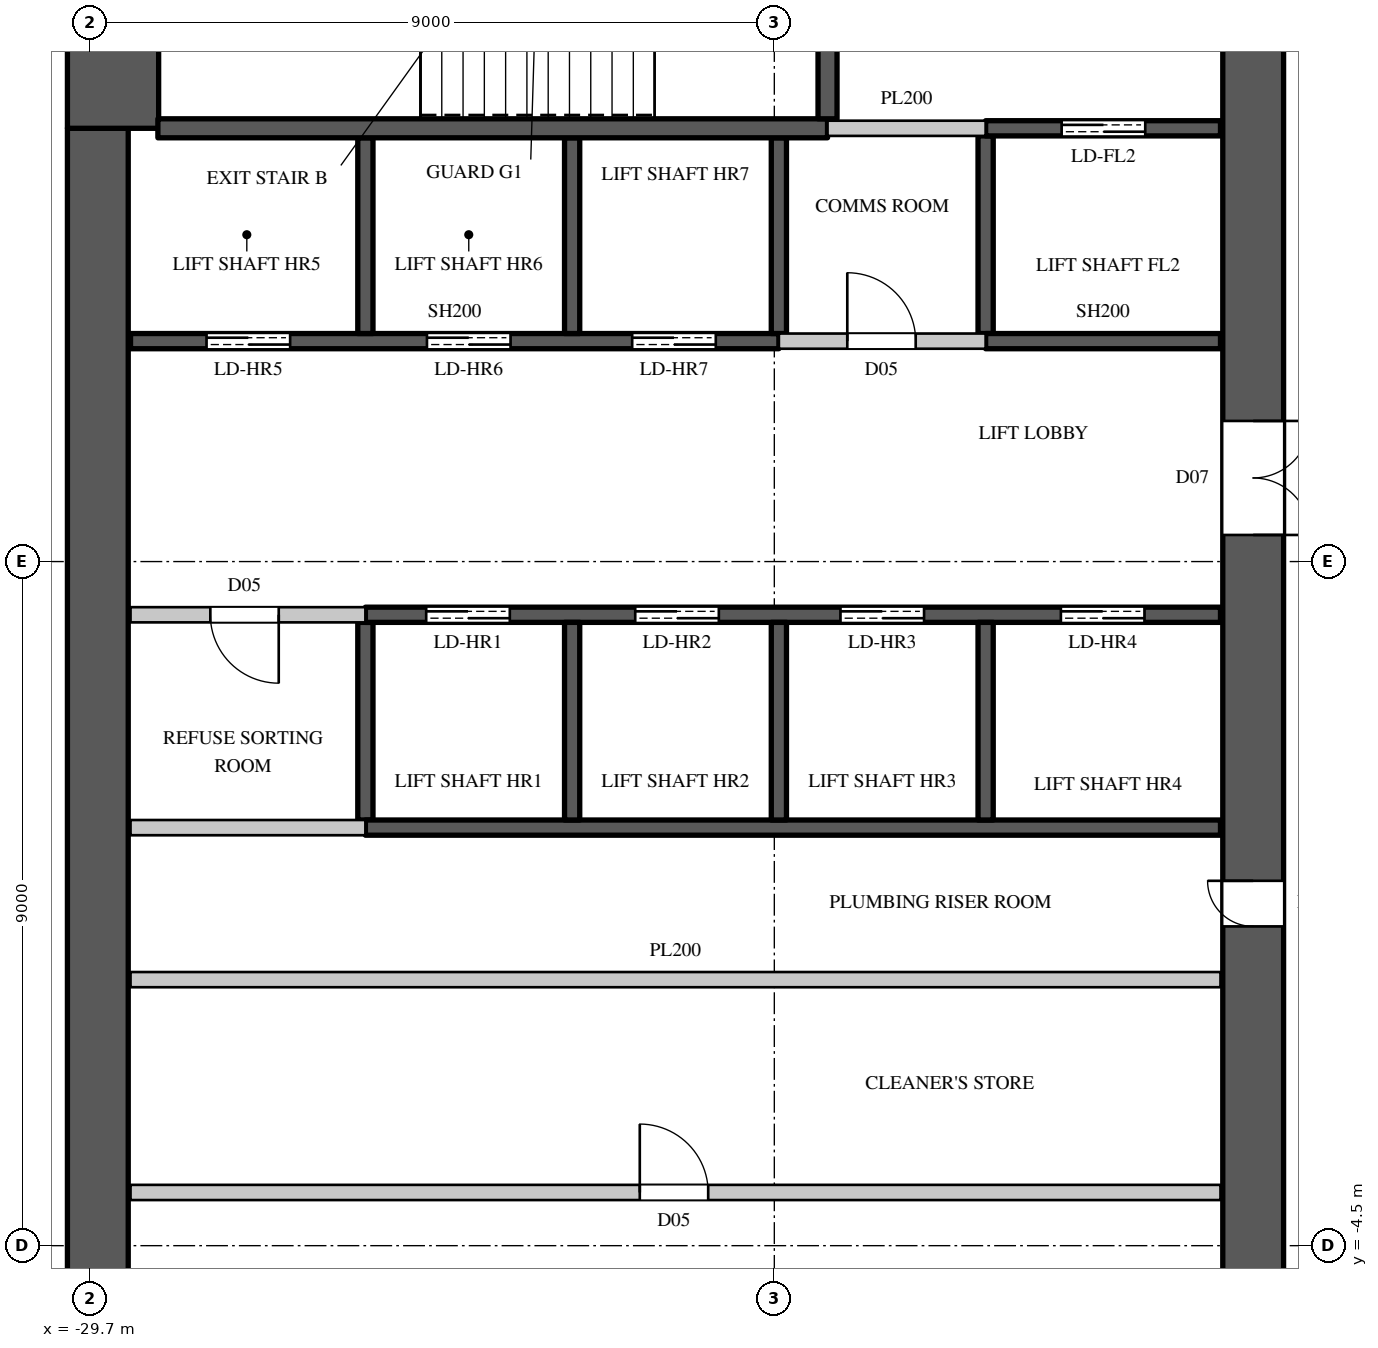
"""IFC4 building model, lengths in metres.
Left out: names, types, materials, properties, quantities, classifications, styles, units other than length and angle.
Written with IfcOpenShell. Run it as: python <this file> out.ifc"""

import sys

from ifc_helpers import new_model, si_unit, direction, frame, frame_2d, origin, place, context, subcontext, project, spatial, rectangle, extrude, element, fill, save


model = new_model("IFC4")
c1 = context("Model", 3, precision=1e-05, world=origin(), true_north=direction((0.0, 1.0)))
c2 = subcontext(c1, "Body", "Model", "MODEL_VIEW")
j1 = project(units=[si_unit("LENGTHUNIT", "METRE"), si_unit("PLANEANGLEUNIT", "RADIAN")], contexts=[c1])
p1 = place(None, origin())
s1 = spatial("IfcSite", under=j1, at=p1, CompositionType="ELEMENT")
p2 = place(p1, origin())
s2 = spatial("IfcBuilding", under=s1, at=p2, CompositionType="ELEMENT")
p3 = place(p2, frame((0.0, 0.0, 181.0)))
s3 = spatial("IfcBuildingStorey", under=s2, at=p3, CompositionType="ELEMENT", Elevation=181.0)
p4 = place(p3, frame((-14.4, -14.8, 0.0), z_axis=(0.0, 0.0, 1.0), x_axis=(0.0, 1.0, 0.0)))
e1 = element("IfcWall", 1, at=p4, inside=s3, PredefinedType="SHEAR", context=c2, shape_type="SweptSolid", body=[
    extrude(rectangle(XDim=29.6, YDim=0.8, at=frame_2d((14.8, 0.0))), origin(), (0.0, 0.0, 1.0), 4.1),
])
p5 = place(p4, frame((1.55, 0.0, 0.0)))
e2 = element("IfcOpeningElement", 2, at=p5, cuts=e1, PredefinedType="OPENING", context=c2, shape_type="SweptSolid", body=[
    extrude(rectangle(XDim=1.5, YDim=2.4, at=frame_2d((0.75, 1.2))), frame((0.0, 0.41, 0.0), z_axis=(0.0, -1.0, 0.0), x_axis=(1.0, 0.0, 0.0)), (0.0, 0.0, 1.0), 0.82),
])
p6 = place(p4, frame((26.55, 0.0, 0.0)))
e3 = element("IfcOpeningElement", 3, at=p6, cuts=e1, PredefinedType="OPENING", context=c2, shape_type="SweptSolid", body=[
    extrude(rectangle(XDim=1.5, YDim=2.4, at=frame_2d((0.75, 1.2))), frame((0.0, 0.41, 0.0), z_axis=(0.0, -1.0, 0.0), x_axis=(1.0, 0.0, 0.0)), (0.0, 0.0, 1.0), 0.82),
])
p7 = place(p4, frame((8.45, 0.0, 0.0)))
e4 = element("IfcOpeningElement", 4, at=p7, cuts=e1, PredefinedType="OPENING", context=c2, shape_type="SweptSolid", body=[
    extrude(rectangle(XDim=1.5, YDim=2.4, at=frame_2d((0.75, 1.2))), frame((0.0, 0.41, 0.0), z_axis=(0.0, -1.0, 0.0), x_axis=(1.0, 0.0, 0.0)), (0.0, 0.0, 1.0), 0.82),
])
p8 = place(p4, frame((19.65, 0.0, 0.0)))
e5 = element("IfcOpeningElement", 5, at=p8, cuts=e1, PredefinedType="OPENING", context=c2, shape_type="SweptSolid", body=[
    extrude(rectangle(XDim=1.5, YDim=2.4, at=frame_2d((0.75, 1.2))), frame((0.0, 0.41, 0.0), z_axis=(0.0, -1.0, 0.0), x_axis=(1.0, 0.0, 0.0)), (0.0, 0.0, 1.0), 0.82),
])
p9 = place(p4, frame((14.5, 0.0, 0.0)))
e6 = element("IfcOpeningElement", 6, at=p9, cuts=e1, PredefinedType="OPENING", context=c2, shape_type="SweptSolid", body=[
    extrude(rectangle(XDim=0.6, YDim=2.0, at=frame_2d((0.3, 1.0))), frame((0.0, 0.41, 0.0), z_axis=(0.0, -1.0, 0.0), x_axis=(1.0, 0.0, 0.0)), (0.0, 0.0, 1.0), 0.82),
])
p10 = place(p3, frame((-29.6, -10.2, 0.0), z_axis=(0.0, 0.0, 1.0), x_axis=(0.0, 1.0, 0.0)))
e7 = element("IfcWall", 7, at=p10, inside=s3, PredefinedType="SHEAR", context=c2, shape_type="SweptSolid", body=[
    extrude(rectangle(XDim=20.4, YDim=0.8, at=frame_2d((10.2, 0.0))), origin(), (0.0, 0.0, 1.0), 4.1),
])
p11 = place(p3, frame((-29.4, 10.2, 0.0), z_axis=(0.0, 0.0, 1.0), x_axis=(0.0, 1.0, 0.0)))
e8 = element("IfcWall", 8, at=p11, inside=s3, PredefinedType="SHEAR", context=c2, shape_type="SweptSolid", body=[
    extrude(rectangle(XDim=4.6, YDim=1.2, at=frame_2d((2.3, 0.0))), origin(), (0.0, 0.0, 1.0), 4.1),
])
p12 = place(p3, frame((-29.17, -3.8, 0.0), z_axis=(0.0, 0.0, 1.0), x_axis=(1.0, 0.0, 0.0)))
e9 = element("IfcWall", 9, at=p12, inside=s3, PredefinedType="PARTITIONING", context=c2, shape_type="SweptSolid", body=[
    extrude(rectangle(XDim=14.34, YDim=0.2, at=frame_2d((7.17, 0.0))), origin(), (0.0, 0.0, 1.0), 3.8),
])
p13 = place(p12, frame((6.7, 0.0, 0.0)))
e10 = element("IfcOpeningElement", 10, at=p13, cuts=e9, PredefinedType="OPENING", context=c2, shape_type="SweptSolid", body=[
    extrude(rectangle(XDim=0.9, YDim=2.2, at=frame_2d((0.45, 1.1))), frame((0.0, 0.11, 0.0), z_axis=(0.0, -1.0, 0.0), x_axis=(1.0, 0.0, 0.0)), (0.0, 0.0, 1.0), 0.22),
])
p14 = place(p3, frame((-29.17, 3.8, 0.0), z_axis=(0.0, 0.0, 1.0), x_axis=(1.0, 0.0, 0.0)))
e11 = element("IfcWall", 11, at=p14, inside=s3, PredefinedType="PARTITIONING", context=c2, shape_type="SweptSolid", body=[
    extrude(rectangle(XDim=3.09, YDim=0.2, at=frame_2d((1.545, 0.0))), origin(), (0.0, 0.0, 1.0), 3.8),
])
p15 = place(p14, frame((1.05, 0.0, 0.0)))
e12 = element("IfcOpeningElement", 12, at=p15, cuts=e11, PredefinedType="OPENING", context=c2, shape_type="SweptSolid", body=[
    extrude(rectangle(XDim=0.9, YDim=2.2, at=frame_2d((0.45, 1.1))), frame((0.0, 0.11, 0.0), z_axis=(0.0, -1.0, 0.0), x_axis=(1.0, 0.0, 0.0)), (0.0, 0.0, 1.0), 0.22),
])
p16 = place(p3, frame((-29.17, -1.0, 0.0), z_axis=(0.0, 0.0, 1.0), x_axis=(1.0, 0.0, 0.0)))
e13 = element("IfcWall", 13, at=p16, inside=s3, PredefinedType="PARTITIONING", context=c2, shape_type="SweptSolid", body=[
    extrude(rectangle(XDim=14.34, YDim=0.2, at=frame_2d((7.17, 0.0))), origin(), (0.0, 0.0, 1.0), 3.8),
])
p17 = place(p3, frame((-29.17, 1.0, 0.0), z_axis=(0.0, 0.0, 1.0), x_axis=(1.0, 0.0, 0.0)))
e14 = element("IfcWall", 14, at=p17, inside=s3, PredefinedType="PARTITIONING", context=c2, shape_type="SweptSolid", body=[
    extrude(rectangle(XDim=3.09, YDim=0.2, at=frame_2d((1.545, 0.0))), origin(), (0.0, 0.0, 1.0), 3.8),
])
p18 = place(p3, frame((-20.64, 7.4, 0.0), z_axis=(0.0, 0.0, 1.0), x_axis=(1.0, 0.0, 0.0)))
e15 = element("IfcWall", 15, at=p18, inside=s3, PredefinedType="PARTITIONING", context=c2, shape_type="SweptSolid", body=[
    extrude(rectangle(XDim=2.72, YDim=0.2, at=frame_2d((1.36, 0.0))), origin(), (0.0, 0.0, 1.0), 3.8),
])
p19 = place(p18, frame((0.9, 0.0, 0.0)))
e16 = element("IfcOpeningElement", 16, at=p19, cuts=e15, PredefinedType="OPENING", context=c2, shape_type="SweptSolid", body=[
    extrude(rectangle(XDim=0.9, YDim=2.2, at=frame_2d((0.45, 1.1))), frame((0.0, 0.11, 0.0), z_axis=(0.0, -1.0, 0.0), x_axis=(1.0, 0.0, 0.0)), (0.0, 0.0, 1.0), 0.22),
])
p20 = place(p3, frame((-20.0, 10.2, 0.0), z_axis=(0.0, 0.0, 1.0), x_axis=(1.0, 0.0, 0.0)))
e17 = element("IfcWall", 17, at=p20, inside=s3, PredefinedType="PARTITIONING", context=c2, shape_type="SweptSolid", body=[
    extrude(rectangle(XDim=2.08, YDim=0.2, at=frame_2d((1.04, 0.0))), origin(), (0.0, 0.0, 1.0), 3.8),
])
p21 = place(p3, frame((-29.17, 7.4, 0.0), z_axis=(0.0, 0.0, 1.0), x_axis=(1.0, 0.0, 0.0)))
e18 = element("IfcWall", 18, at=p21, inside=s3, PredefinedType="SHEAR", context=c2, shape_type="SweptSolid", body=[
    extrude(rectangle(XDim=8.53, YDim=0.2, at=frame_2d((4.265, 0.0))), origin(), (0.0, 0.0, 1.0), 3.8),
])
p22 = place(p21, frame((1.0, 0.0, 0.0)))
e19 = element("IfcOpeningElement", 19, at=p22, cuts=e18, PredefinedType="OPENING", context=c2, shape_type="SweptSolid", body=[
    extrude(rectangle(XDim=1.1, YDim=2.2, at=frame_2d((0.55, 1.1))), frame((0.0, 0.11, 0.0), z_axis=(0.0, -1.0, 0.0), x_axis=(1.0, 0.0, 0.0)), (0.0, 0.0, 1.0), 0.22),
])
p23 = place(p21, frame((3.9, 0.0, 0.0)))
e20 = element("IfcOpeningElement", 20, at=p23, cuts=e18, PredefinedType="OPENING", context=c2, shape_type="SweptSolid", body=[
    extrude(rectangle(XDim=1.1, YDim=2.2, at=frame_2d((0.55, 1.1))), frame((0.0, 0.11, 0.0), z_axis=(0.0, -1.0, 0.0), x_axis=(1.0, 0.0, 0.0)), (0.0, 0.0, 1.0), 0.22),
])
p24 = place(p21, frame((6.6, 0.0, 0.0)))
e21 = element("IfcOpeningElement", 21, at=p24, cuts=e18, PredefinedType="OPENING", context=c2, shape_type="SweptSolid", body=[
    extrude(rectangle(XDim=1.1, YDim=2.2, at=frame_2d((0.55, 1.1))), frame((0.0, 0.11, 0.0), z_axis=(0.0, -1.0, 0.0), x_axis=(1.0, 0.0, 0.0)), (0.0, 0.0, 1.0), 0.22),
])
p25 = place(p3, frame((-26.08, 1.1, 0.0), z_axis=(0.0, 0.0, 1.0), x_axis=(0.0, 1.0, 0.0)))
e22 = element("IfcWall", 22, at=p25, inside=s3, PredefinedType="SHEAR", context=c2, shape_type="SweptSolid", body=[
    extrude(rectangle(XDim=2.6, YDim=0.2, at=frame_2d((1.3, 0.0))), origin(), (0.0, 0.0, 1.0), 3.8),
])
p26 = place(p3, frame((-26.08, 1.0, 0.0), z_axis=(0.0, 0.0, 1.0), x_axis=(1.0, 0.0, 0.0)))
e23 = element("IfcWall", 23, at=p26, inside=s3, PredefinedType="SHEAR", context=c2, shape_type="SweptSolid", body=[
    extrude(rectangle(XDim=11.25, YDim=0.2, at=frame_2d((5.625, 0.0))), origin(), (0.0, 0.0, 1.0), 3.8),
])
p27 = place(p3, frame((-26.08, 3.8, 0.0), z_axis=(0.0, 0.0, 1.0), x_axis=(1.0, 0.0, 0.0)))
e24 = element("IfcWall", 24, at=p27, inside=s3, PredefinedType="SHEAR", context=c2, shape_type="SweptSolid", body=[
    extrude(rectangle(XDim=11.25, YDim=0.2, at=frame_2d((5.625, 0.0))), origin(), (0.0, 0.0, 1.0), 3.8),
])
p28 = place(p27, frame((0.8, 0.0, 0.0)))
e25 = element("IfcOpeningElement", 25, at=p28, cuts=e24, PredefinedType="OPENING", context=c2, shape_type="SweptSolid", body=[
    extrude(rectangle(XDim=1.1, YDim=2.2, at=frame_2d((0.55, 1.1))), frame((0.0, 0.11, 0.0), z_axis=(0.0, -1.0, 0.0), x_axis=(1.0, 0.0, 0.0)), (0.0, 0.0, 1.0), 0.22),
])
p29 = place(p27, frame((3.55, 0.0, 0.0)))
e26 = element("IfcOpeningElement", 26, at=p29, cuts=e24, PredefinedType="OPENING", context=c2, shape_type="SweptSolid", body=[
    extrude(rectangle(XDim=1.1, YDim=2.2, at=frame_2d((0.55, 1.1))), frame((0.0, 0.11, 0.0), z_axis=(0.0, -1.0, 0.0), x_axis=(1.0, 0.0, 0.0)), (0.0, 0.0, 1.0), 0.22),
])
p30 = place(p27, frame((6.25, 0.0, 0.0)))
e27 = element("IfcOpeningElement", 27, at=p30, cuts=e24, PredefinedType="OPENING", context=c2, shape_type="SweptSolid", body=[
    extrude(rectangle(XDim=1.1, YDim=2.2, at=frame_2d((0.55, 1.1))), frame((0.0, 0.11, 0.0), z_axis=(0.0, -1.0, 0.0), x_axis=(1.0, 0.0, 0.0)), (0.0, 0.0, 1.0), 0.22),
])
p31 = place(p27, frame((9.15, 0.0, 0.0)))
e28 = element("IfcOpeningElement", 28, at=p31, cuts=e24, PredefinedType="OPENING", context=c2, shape_type="SweptSolid", body=[
    extrude(rectangle(XDim=1.1, YDim=2.2, at=frame_2d((0.55, 1.1))), frame((0.0, 0.11, 0.0), z_axis=(0.0, -1.0, 0.0), x_axis=(1.0, 0.0, 0.0)), (0.0, 0.0, 1.0), 0.22),
])
p32 = place(p3, frame((-26.08, 7.5, 0.0), z_axis=(0.0, 0.0, 1.0), x_axis=(0.0, 1.0, 0.0)))
e29 = element("IfcWall", 29, at=p32, inside=s3, PredefinedType="SHEAR", context=c2, shape_type="SweptSolid", body=[
    extrude(rectangle(XDim=2.575, YDim=0.2, at=frame_2d((1.288, 0.0))), origin(), (0.0, 0.0, 1.0), 4.1),
])
p33 = place(p3, frame((-23.36, 1.1, 0.0), z_axis=(0.0, 0.0, 1.0), x_axis=(0.0, 1.0, 0.0)))
e30 = element("IfcWall", 30, at=p33, inside=s3, PredefinedType="SHEAR", context=c2, shape_type="SweptSolid", body=[
    extrude(rectangle(XDim=2.6, YDim=0.2, at=frame_2d((1.3, 0.0))), origin(), (0.0, 0.0, 1.0), 4.1),
])
p34 = place(p3, frame((-23.36, 7.5, 0.0), z_axis=(0.0, 0.0, 1.0), x_axis=(0.0, 1.0, 0.0)))
e31 = element("IfcWall", 31, at=p34, inside=s3, PredefinedType="SHEAR", context=c2, shape_type="SweptSolid", body=[
    extrude(rectangle(XDim=2.575, YDim=0.2, at=frame_2d((1.288, 0.0))), origin(), (0.0, 0.0, 1.0), 4.1),
])
p35 = place(p3, frame((-20.64, 1.1, 0.0), z_axis=(0.0, 0.0, 1.0), x_axis=(0.0, 1.0, 0.0)))
e32 = element("IfcWall", 32, at=p35, inside=s3, PredefinedType="SHEAR", context=c2, shape_type="SweptSolid", body=[
    extrude(rectangle(XDim=2.6, YDim=0.2, at=frame_2d((1.3, 0.0))), origin(), (0.0, 0.0, 1.0), 4.1),
])
p36 = place(p3, frame((-20.64, 7.5, 0.0), z_axis=(0.0, 0.0, 1.0), x_axis=(0.0, 1.0, 0.0)))
e33 = element("IfcWall", 33, at=p36, inside=s3, PredefinedType="SHEAR", context=c2, shape_type="SweptSolid", body=[
    extrude(rectangle(XDim=2.575, YDim=0.2, at=frame_2d((1.288, 0.0))), origin(), (0.0, 0.0, 1.0), 3.8),
])
p37 = place(p3, frame((-17.92, 1.1, 0.0), z_axis=(0.0, 0.0, 1.0), x_axis=(0.0, 1.0, 0.0)))
e34 = element("IfcWall", 34, at=p37, inside=s3, PredefinedType="SHEAR", context=c2, shape_type="SweptSolid", body=[
    extrude(rectangle(XDim=2.6, YDim=0.2, at=frame_2d((1.3, 0.0))), origin(), (0.0, 0.0, 1.0), 4.1),
])
p38 = place(p3, frame((-17.92, 7.5, 0.0), z_axis=(0.0, 0.0, 1.0), x_axis=(0.0, 1.0, 0.0)))
e35 = element("IfcWall", 35, at=p38, inside=s3, PredefinedType="SHEAR", context=c2, shape_type="SweptSolid", body=[
    extrude(rectangle(XDim=2.6, YDim=0.2, at=frame_2d((1.3, 0.0))), origin(), (0.0, 0.0, 1.0), 3.8),
])
p39 = place(p3, frame((-17.92, 7.4, 0.0), z_axis=(0.0, 0.0, 1.0), x_axis=(1.0, 0.0, 0.0)))
e36 = element("IfcWall", 36, at=p39, inside=s3, PredefinedType="SHEAR", context=c2, shape_type="SweptSolid", body=[
    extrude(rectangle(XDim=3.09, YDim=0.2, at=frame_2d((1.545, 0.0))), origin(), (0.0, 0.0, 1.0), 3.8),
])
p40 = place(p3, frame((-17.92, 10.2, 0.0), z_axis=(0.0, 0.0, 1.0), x_axis=(1.0, 0.0, 0.0)))
e37 = element("IfcWall", 37, at=p40, inside=s3, PredefinedType="SHEAR", context=c2, shape_type="SweptSolid", body=[
    extrude(rectangle(XDim=3.09, YDim=0.2, at=frame_2d((1.545, 0.0))), origin(), (0.0, 0.0, 1.0), 3.8),
])
p41 = place(p40, frame((1.0, 0.0, 0.0)))
e38 = element("IfcOpeningElement", 38, at=p41, cuts=e37, PredefinedType="OPENING", context=c2, shape_type="SweptSolid", body=[
    extrude(rectangle(XDim=1.1, YDim=2.2, at=frame_2d((0.55, 1.1))), frame((0.0, 0.11, 0.0), z_axis=(0.0, -1.0, 0.0), x_axis=(1.0, 0.0, 0.0)), (0.0, 0.0, 1.0), 0.22),
])
p42 = place(p3, frame((-28.81, 10.2, 0.0), z_axis=(0.0, 0.0, 1.0), x_axis=(1.0, 0.0, 0.0)))
e39 = element("IfcWall", 39, at=p42, inside=s3, PredefinedType="SHEAR", context=c2, shape_type="SweptSolid", body=[
    extrude(rectangle(XDim=8.81, YDim=0.25, at=frame_2d((4.405, 0.0))), origin(), (0.0, 0.0, 1.0), 3.8),
])
p43 = place(p3, frame((-20.0, 10.325, 0.0), z_axis=(0.0, 0.0, 1.0), x_axis=(0.0, 1.0, 0.0)))
e40 = element("IfcWall", 40, at=p43, inside=s3, PredefinedType="SHEAR", context=c2, shape_type="SweptSolid", body=[
    extrude(rectangle(XDim=4.445, YDim=0.25, at=frame_2d((2.223, 0.0))), origin(), (0.0, 0.0, 1.0), 3.8),
])
p44 = place(p43, frame((1.65, 0.0, 0.0)))
e41 = element("IfcOpeningElement", 41, at=p44, cuts=e40, PredefinedType="OPENING", context=c2, shape_type="SweptSolid", body=[
    extrude(rectangle(XDim=1.1, YDim=2.2, at=frame_2d((0.55, 1.1))), frame((0.0, 0.135, 0.0), z_axis=(0.0, -1.0, 0.0), x_axis=(1.0, 0.0, 0.0)), (0.0, 0.0, 1.0), 0.27),
])
p45 = place(p13, origin())
e42 = element("IfcDoor", 42, at=p45, inside=s3, OperationType="SINGLE_SWING_LEFT", PredefinedType="DOOR", context=c2, shape_type="SweptSolid", body=[
    extrude(rectangle(XDim=0.9, YDim=2.2, at=frame_2d((0.45, 1.1))), frame((0.0, 0.025, 0.0), z_axis=(0.0, -1.0, 0.0), x_axis=(1.0, 0.0, 0.0)), (0.0, 0.0, 1.0), 0.05),
])
fill(e10, e42)
p46 = place(p15, origin())
e43 = element("IfcDoor", 43, at=p46, inside=s3, OperationType="SINGLE_SWING_LEFT", PredefinedType="DOOR", context=c2, shape_type="SweptSolid", body=[
    extrude(rectangle(XDim=0.9, YDim=2.2, at=frame_2d((0.45, 1.1))), frame((0.0, 0.025, 0.0), z_axis=(0.0, -1.0, 0.0), x_axis=(1.0, 0.0, 0.0)), (0.0, 0.0, 1.0), 0.05),
])
fill(e12, e43)
p47 = place(p19, origin())
e44 = element("IfcDoor", 44, at=p47, inside=s3, OperationType="SINGLE_SWING_LEFT", PredefinedType="DOOR", context=c2, shape_type="SweptSolid", body=[
    extrude(rectangle(XDim=0.9, YDim=2.2, at=frame_2d((0.45, 1.1))), frame((0.0, 0.025, 0.0), z_axis=(0.0, -1.0, 0.0), x_axis=(1.0, 0.0, 0.0)), (0.0, 0.0, 1.0), 0.05),
])
fill(e16, e44)
p48 = place(p28, origin())
e45 = element("IfcDoor", 45, at=p48, inside=s3, OperationType="DOUBLE_DOOR_SLIDING", PredefinedType="DOOR", context=c2, shape_type="SweptSolid", body=[
    extrude(rectangle(XDim=1.1, YDim=2.2, at=frame_2d((0.55, 1.1))), frame((0.0, 0.025, 0.0), z_axis=(0.0, -1.0, 0.0), x_axis=(1.0, 0.0, 0.0)), (0.0, 0.0, 1.0), 0.05),
])
fill(e25, e45)
p49 = place(p29, origin())
e46 = element("IfcDoor", 46, at=p49, inside=s3, OperationType="DOUBLE_DOOR_SLIDING", PredefinedType="DOOR", context=c2, shape_type="SweptSolid", body=[
    extrude(rectangle(XDim=1.1, YDim=2.2, at=frame_2d((0.55, 1.1))), frame((0.0, 0.025, 0.0), z_axis=(0.0, -1.0, 0.0), x_axis=(1.0, 0.0, 0.0)), (0.0, 0.0, 1.0), 0.05),
])
fill(e26, e46)
p50 = place(p30, origin())
e47 = element("IfcDoor", 47, at=p50, inside=s3, OperationType="DOUBLE_DOOR_SLIDING", PredefinedType="DOOR", context=c2, shape_type="SweptSolid", body=[
    extrude(rectangle(XDim=1.1, YDim=2.2, at=frame_2d((0.55, 1.1))), frame((0.0, 0.025, 0.0), z_axis=(0.0, -1.0, 0.0), x_axis=(1.0, 0.0, 0.0)), (0.0, 0.0, 1.0), 0.05),
])
fill(e27, e47)
p51 = place(p31, origin())
e48 = element("IfcDoor", 48, at=p51, inside=s3, OperationType="DOUBLE_DOOR_SLIDING", PredefinedType="DOOR", context=c2, shape_type="SweptSolid", body=[
    extrude(rectangle(XDim=1.1, YDim=2.2, at=frame_2d((0.55, 1.1))), frame((0.0, 0.025, 0.0), z_axis=(0.0, -1.0, 0.0), x_axis=(1.0, 0.0, 0.0)), (0.0, 0.0, 1.0), 0.05),
])
fill(e28, e48)
p52 = place(p22, origin())
e49 = element("IfcDoor", 49, at=p52, inside=s3, OperationType="DOUBLE_DOOR_SLIDING", PredefinedType="DOOR", context=c2, shape_type="SweptSolid", body=[
    extrude(rectangle(XDim=1.1, YDim=2.2, at=frame_2d((0.55, 1.1))), frame((0.0, 0.025, 0.0), z_axis=(0.0, -1.0, 0.0), x_axis=(1.0, 0.0, 0.0)), (0.0, 0.0, 1.0), 0.05),
])
fill(e19, e49)
p53 = place(p23, origin())
e50 = element("IfcDoor", 50, at=p53, inside=s3, OperationType="DOUBLE_DOOR_SLIDING", PredefinedType="DOOR", context=c2, shape_type="SweptSolid", body=[
    extrude(rectangle(XDim=1.1, YDim=2.2, at=frame_2d((0.55, 1.1))), frame((0.0, 0.025, 0.0), z_axis=(0.0, -1.0, 0.0), x_axis=(1.0, 0.0, 0.0)), (0.0, 0.0, 1.0), 0.05),
])
fill(e20, e50)
p54 = place(p24, origin())
e51 = element("IfcDoor", 51, at=p54, inside=s3, OperationType="DOUBLE_DOOR_SLIDING", PredefinedType="DOOR", context=c2, shape_type="SweptSolid", body=[
    extrude(rectangle(XDim=1.1, YDim=2.2, at=frame_2d((0.55, 1.1))), frame((0.0, 0.025, 0.0), z_axis=(0.0, -1.0, 0.0), x_axis=(1.0, 0.0, 0.0)), (0.0, 0.0, 1.0), 0.05),
])
fill(e21, e51)
p55 = place(p41, origin())
e52 = element("IfcDoor", 52, at=p55, inside=s3, OperationType="DOUBLE_DOOR_SLIDING", PredefinedType="DOOR", context=c2, shape_type="SweptSolid", body=[
    extrude(rectangle(XDim=1.1, YDim=2.2, at=frame_2d((0.55, 1.1))), frame((0.0, 0.025, 0.0), z_axis=(0.0, -1.0, 0.0), x_axis=(1.0, 0.0, 0.0)), (0.0, 0.0, 1.0), 0.05),
])
fill(e38, e52)
p56 = place(p8, origin())
e53 = element("IfcDoor", 53, at=p56, inside=s3, OperationType="DOUBLE_DOOR_SINGLE_SWING", PredefinedType="DOOR", context=c2, shape_type="SweptSolid", body=[
    extrude(rectangle(XDim=1.5, YDim=2.4, at=frame_2d((0.75, 1.2))), frame((0.0, -0.345, 0.0), z_axis=(0.0, -1.0, 0.0), x_axis=(1.0, 0.0, 0.0)), (0.0, 0.0, 1.0), 0.05),
])
fill(e5, e53)
p57 = place(p9, origin())
e54 = element("IfcDoor", 54, at=p57, inside=s3, OperationType="SINGLE_SWING_RIGHT", PredefinedType="DOOR", context=c2, shape_type="SweptSolid", body=[
    extrude(rectangle(XDim=0.6, YDim=2.0, at=frame_2d((0.3, 1.0))), frame((0.0, 0.395, 0.0), z_axis=(0.0, -1.0, 0.0), x_axis=(1.0, 0.0, 0.0)), (0.0, 0.0, 1.0), 0.05),
])
fill(e6, e54)
save(model, sys.argv[1])
